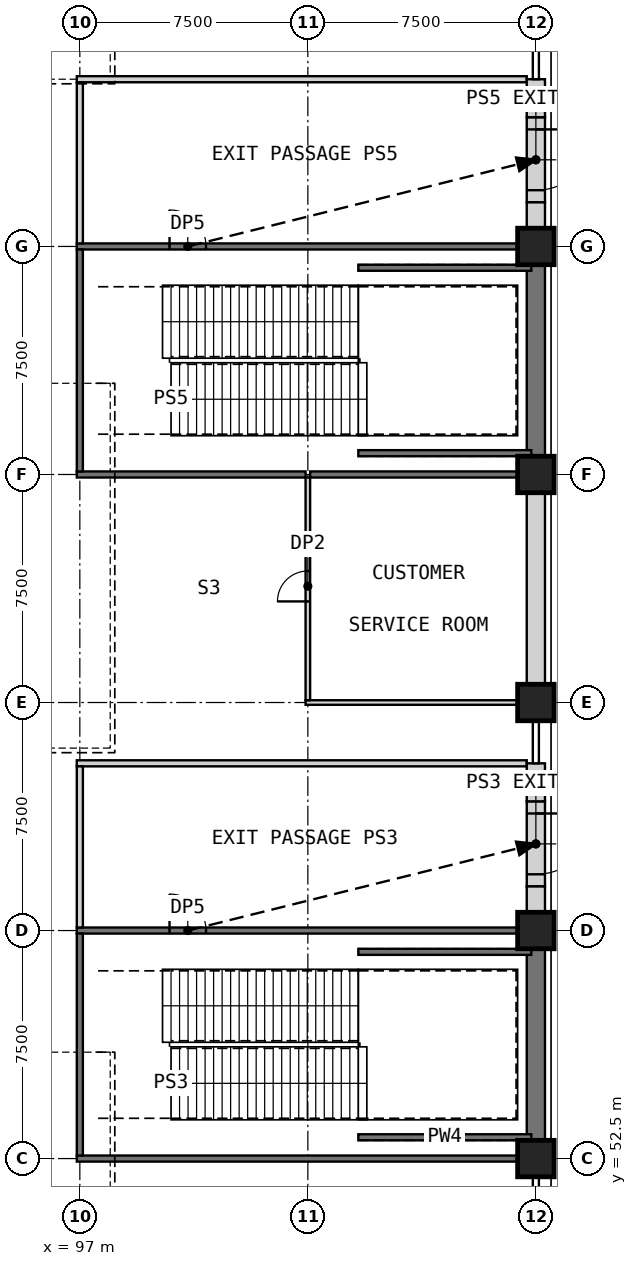
"""IFC4 building model, lengths in metres.
Left out: names, types, materials, properties, quantities, classifications, styles, units other than length and angle.
Written with IfcOpenShell. Run it as: python <this file> out.ifc"""

import sys

from ifc_helpers import new_model, si_unit, direction, frame, frame_2d, origin, origin_2d, place, context, subcontext, project, spatial, rectangle, extrude, element, fill, save


model = new_model("IFC4")
c1 = context("Model", 3, precision=1e-05, world=origin(), true_north=direction((0.0, 1.0)))
c2 = subcontext(c1, "Body", "Model", "MODEL_VIEW")
j1 = project(units=[si_unit("LENGTHUNIT", "METRE"), si_unit("PLANEANGLEUNIT", "RADIAN")], contexts=[c1])
p1 = place(None, origin())
s1 = spatial("IfcSite", under=j1, at=p1, CompositionType="ELEMENT")
p2 = place(p1, origin())
s2 = spatial("IfcBuilding", under=s1, at=p2, CompositionType="ELEMENT")
p3 = place(p2, origin())
s3 = spatial("IfcBuildingStorey", under=s2, at=p3, CompositionType="ELEMENT", Elevation=0.0)
for number, where, z_axis, x_axis in (
    (1, (112.0, 52.5, 0.0), (0.0, 0.0, 1.0), (1.0, 0.0, 0.0)),
    (2, (112.0, 60.0, 0.0), (0.0, 0.0, 1.0), (1.0, 0.0, 0.0)),
    (3, (112.0, 67.5, 0.0), (0.0, 0.0, 1.0), (1.0, 0.0, 0.0)),
    (4, (112.0, 75.0, 0.0), (0.0, 0.0, 1.0), (1.0, 0.0, 0.0)),
    (5, (112.0, 82.5, 0.0), (0.0, 0.0, 1.0), (1.0, 0.0, 0.0)),
):
    element("IfcColumn", number, at=place(p3, frame(where, z_axis=z_axis, x_axis=x_axis)), inside=s3, PredefinedType="COLUMN", context=c2, shape_type="SweptSolid", body=[
        extrude(rectangle(XDim=1.2, YDim=1.2, at=origin_2d()), origin(), (0.0, 0.0, 1.0), 8.0),
    ])
p4 = place(p3, frame((96.9, 52.5, 0.0), z_axis=(0.0, 0.0, 1.0), x_axis=(1.0, 0.0, 0.0)))
e6 = element("IfcWall", 6, at=p4, inside=s3, PredefinedType="SHEAR", context=c2, shape_type="SweptSolid", body=[
    extrude(rectangle(XDim=14.5, YDim=0.2, at=frame_2d((7.25, 0.0))), origin(), (0.0, 0.0, 1.0), 5.5),
])
p5 = place(p3, frame((96.9, 60.0, 0.0), z_axis=(0.0, 0.0, 1.0), x_axis=(1.0, 0.0, 0.0)))
e7 = element("IfcWall", 7, at=p5, inside=s3, PredefinedType="SHEAR", context=c2, shape_type="SweptSolid", body=[
    extrude(rectangle(XDim=14.5, YDim=0.2, at=frame_2d((7.25, 0.0))), origin(), (0.0, 0.0, 1.0), 5.5),
])
p6 = place(p5, frame((3.05, 0.0, 0.0)))
e8 = element("IfcOpeningElement", 8, at=p6, cuts=e7, PredefinedType="OPENING", context=c2, shape_type="SweptSolid", body=[
    extrude(rectangle(XDim=1.2, YDim=2.1, at=frame_2d((0.6, 1.05))), frame((0.0, 0.11, 0.0), z_axis=(0.0, -1.0, 0.0), x_axis=(1.0, 0.0, 0.0)), (0.0, 0.0, 1.0), 0.22),
])
p7 = place(p3, frame((96.9, 82.5, 0.0), z_axis=(0.0, 0.0, 1.0), x_axis=(1.0, 0.0, 0.0)))
e9 = element("IfcWall", 9, at=p7, inside=s3, PredefinedType="SHEAR", context=c2, shape_type="SweptSolid", body=[
    extrude(rectangle(XDim=14.5, YDim=0.2, at=frame_2d((7.25, 0.0))), origin(), (0.0, 0.0, 1.0), 5.5),
])
p8 = place(p7, frame((3.05, 0.0, 0.0)))
e10 = element("IfcOpeningElement", 10, at=p8, cuts=e9, PredefinedType="OPENING", context=c2, shape_type="SweptSolid", body=[
    extrude(rectangle(XDim=1.2, YDim=2.1, at=frame_2d((0.6, 1.05))), frame((0.0, 0.11, 0.0), z_axis=(0.0, -1.0, 0.0), x_axis=(1.0, 0.0, 0.0)), (0.0, 0.0, 1.0), 0.22),
])
p9 = place(p3, frame((96.9, 75.0, 0.0), z_axis=(0.0, 0.0, 1.0), x_axis=(1.0, 0.0, 0.0)))
e11 = element("IfcWall", 11, at=p9, inside=s3, PredefinedType="SHEAR", context=c2, shape_type="SweptSolid", body=[
    extrude(rectangle(XDim=7.525, YDim=0.2, at=frame_2d((3.763, 0.0))), origin(), (0.0, 0.0, 1.0), 5.5),
])
p10 = place(p3, frame((104.575, 75.0, 0.0), z_axis=(0.0, 0.0, 1.0), x_axis=(1.0, 0.0, 0.0)))
e12 = element("IfcWall", 12, at=p10, inside=s3, PredefinedType="SHEAR", context=c2, shape_type="SweptSolid", body=[
    extrude(rectangle(XDim=6.825, YDim=0.2, at=frame_2d((3.413, 0.0))), origin(), (0.0, 0.0, 1.0), 5.5),
])
p11 = place(p3, frame((96.9, 65.5, 0.0), z_axis=(0.0, 0.0, 1.0), x_axis=(1.0, 0.0, 0.0)))
e13 = element("IfcWall", 13, at=p11, inside=s3, PredefinedType="PARTITIONING", context=c2, shape_type="SweptSolid", body=[
    extrude(rectangle(XDim=14.8, YDim=0.2, at=frame_2d((7.4, 0.0))), origin(), (0.0, 0.0, 1.0), 7.7),
])
p12 = place(p3, frame((104.425, 67.5, 0.0), z_axis=(0.0, 0.0, 1.0), x_axis=(1.0, 0.0, 0.0)))
e14 = element("IfcWall", 14, at=p12, inside=s3, PredefinedType="PARTITIONING", context=c2, shape_type="SweptSolid", body=[
    extrude(rectangle(XDim=6.975, YDim=0.15, at=frame_2d((3.487, 0.0))), origin(), (0.0, 0.0, 1.0), 5.5),
])
p13 = place(p3, frame((96.9, 88.0, 0.0), z_axis=(0.0, 0.0, 1.0), x_axis=(1.0, 0.0, 0.0)))
e15 = element("IfcWall", 15, at=p13, inside=s3, PredefinedType="PARTITIONING", context=c2, shape_type="SweptSolid", body=[
    extrude(rectangle(XDim=14.8, YDim=0.2, at=frame_2d((7.4, 0.0))), origin(), (0.0, 0.0, 1.0), 7.7),
])
p14 = place(p3, frame((112.0, 53.1, 0.0), z_axis=(0.0, 0.0, 1.0), x_axis=(0.0, 1.0, 0.0)))
e16 = element("IfcWall", 16, at=p14, inside=s3, PredefinedType="PARTITIONING", context=c2, shape_type="SweptSolid", body=[
    extrude(rectangle(XDim=6.3, YDim=0.6, at=frame_2d((3.15, 0.0))), origin(), (0.0, 0.0, 1.0), 7.1),
])
p15 = place(p3, frame((112.0, 64.25, 0.0), z_axis=(0.0, 0.0, 1.0), x_axis=(0.0, -1.0, 0.0)))
e17 = element("IfcWall", 17, at=p15, inside=s3, PredefinedType="PARTITIONING", context=c2, shape_type="SweptSolid", body=[
    extrude(rectangle(XDim=2.8, YDim=0.6, at=frame_2d((1.4, 0.0))), origin(), (0.0, 0.0, 1.0), 7.1),
])
p16 = place(p15, frame((0.4, 0.0, 0.0)))
e18 = element("IfcOpeningElement", 18, at=p16, cuts=e17, PredefinedType="OPENING", context=c2, shape_type="SweptSolid", body=[
    extrude(rectangle(XDim=2.0, YDim=2.4, at=frame_2d((1.0, 1.2))), frame((0.0, 0.31, 0.0), z_axis=(0.0, -1.0, 0.0), x_axis=(1.0, 0.0, 0.0)), (0.0, 0.0, 1.0), 0.62),
])
p17 = place(p3, frame((112.0, 60.6, 0.0), z_axis=(0.0, 0.0, 1.0), x_axis=(0.0, 1.0, 0.0)))
e19 = element("IfcWall", 19, at=p17, inside=s3, PredefinedType="PARTITIONING", context=c2, shape_type="SweptSolid", body=[
    extrude(rectangle(XDim=0.85, YDim=0.6, at=frame_2d((0.425, 0.0))), origin(), (0.0, 0.0, 1.0), 7.1),
])
p18 = place(p3, frame((112.0, 64.25, 0.0), z_axis=(0.0, 0.0, 1.0), x_axis=(0.0, 1.0, 0.0)))
e20 = element("IfcWall", 20, at=p18, inside=s3, PredefinedType="PARTITIONING", context=c2, shape_type="SweptSolid", body=[
    extrude(rectangle(XDim=1.25, YDim=0.6, at=frame_2d((0.625, 0.0))), origin(), (0.0, 0.0, 1.0), 7.1),
])
for number, where, z_axis, x_axis in (
    (21, (112.0, 68.1, 0.0), (0.0, 0.0, 1.0), (0.0, 1.0, 0.0)),
    (22, (112.0, 75.6, 0.0), (0.0, 0.0, 1.0), (0.0, 1.0, 0.0)),
):
    element("IfcWall", number, at=place(p3, frame(where, z_axis=z_axis, x_axis=x_axis)), inside=s3, PredefinedType="PARTITIONING", context=c2, shape_type="SweptSolid", body=[
        extrude(rectangle(XDim=6.3, YDim=0.6, at=frame_2d((3.15, 0.0))), origin(), (0.0, 0.0, 1.0), 7.1),
    ])
p19 = place(p3, frame((112.0, 86.75, 0.0), z_axis=(0.0, 0.0, 1.0), x_axis=(0.0, -1.0, 0.0)))
e23 = element("IfcWall", 23, at=p19, inside=s3, PredefinedType="PARTITIONING", context=c2, shape_type="SweptSolid", body=[
    extrude(rectangle(XDim=2.8, YDim=0.6, at=frame_2d((1.4, 0.0))), origin(), (0.0, 0.0, 1.0), 7.1),
])
p20 = place(p19, frame((0.4, 0.0, 0.0)))
e24 = element("IfcOpeningElement", 24, at=p20, cuts=e23, PredefinedType="OPENING", context=c2, shape_type="SweptSolid", body=[
    extrude(rectangle(XDim=2.0, YDim=2.4, at=frame_2d((1.0, 1.2))), frame((0.0, 0.31, 0.0), z_axis=(0.0, -1.0, 0.0), x_axis=(1.0, 0.0, 0.0)), (0.0, 0.0, 1.0), 0.62),
])
p21 = place(p3, frame((112.0, 83.1, 0.0), z_axis=(0.0, 0.0, 1.0), x_axis=(0.0, 1.0, 0.0)))
e25 = element("IfcWall", 25, at=p21, inside=s3, PredefinedType="PARTITIONING", context=c2, shape_type="SweptSolid", body=[
    extrude(rectangle(XDim=0.85, YDim=0.6, at=frame_2d((0.425, 0.0))), origin(), (0.0, 0.0, 1.0), 7.1),
])
p22 = place(p3, frame((112.0, 86.75, 0.0), z_axis=(0.0, 0.0, 1.0), x_axis=(0.0, 1.0, 0.0)))
e26 = element("IfcWall", 26, at=p22, inside=s3, PredefinedType="PARTITIONING", context=c2, shape_type="SweptSolid", body=[
    extrude(rectangle(XDim=1.25, YDim=0.6, at=frame_2d((0.625, 0.0))), origin(), (0.0, 0.0, 1.0), 7.1),
])
p23 = place(p3, frame((97.0, 52.6, 0.0), z_axis=(0.0, 0.0, 1.0), x_axis=(0.0, 1.0, 0.0)))
e27 = element("IfcWall", 27, at=p23, inside=s3, PredefinedType="SHEAR", context=c2, shape_type="SweptSolid", body=[
    extrude(rectangle(XDim=7.3, YDim=0.2, at=frame_2d((3.65, 0.0))), origin(), (0.0, 0.0, 1.0), 5.5),
])
p24 = place(p3, frame((97.0, 60.1, 0.0), z_axis=(0.0, 0.0, 1.0), x_axis=(0.0, 1.0, 0.0)))
e28 = element("IfcWall", 28, at=p24, inside=s3, PredefinedType="PARTITIONING", context=c2, shape_type="SweptSolid", body=[
    extrude(rectangle(XDim=5.3, YDim=0.2, at=frame_2d((2.65, 0.0))), origin(), (0.0, 0.0, 1.0), 5.5),
])
p25 = place(p3, frame((97.0, 75.1, 0.0), z_axis=(0.0, 0.0, 1.0), x_axis=(0.0, 1.0, 0.0)))
e29 = element("IfcWall", 29, at=p25, inside=s3, PredefinedType="SHEAR", context=c2, shape_type="SweptSolid", body=[
    extrude(rectangle(XDim=7.3, YDim=0.2, at=frame_2d((3.65, 0.0))), origin(), (0.0, 0.0, 1.0), 5.5),
])
p26 = place(p3, frame((97.0, 82.6, 0.0), z_axis=(0.0, 0.0, 1.0), x_axis=(0.0, 1.0, 0.0)))
e30 = element("IfcWall", 30, at=p26, inside=s3, PredefinedType="PARTITIONING", context=c2, shape_type="SweptSolid", body=[
    extrude(rectangle(XDim=5.3, YDim=0.2, at=frame_2d((2.65, 0.0))), origin(), (0.0, 0.0, 1.0), 5.5),
])
p27 = place(p3, frame((104.5, 67.575, 0.0), z_axis=(0.0, 0.0, 1.0), x_axis=(0.0, 1.0, 0.0)))
e31 = element("IfcWall", 31, at=p27, inside=s3, PredefinedType="PARTITIONING", context=c2, shape_type="SweptSolid", body=[
    extrude(rectangle(XDim=7.325, YDim=0.15, at=frame_2d((3.663, 0.0))), origin(), (0.0, 0.0, 1.0), 5.5),
])
p28 = place(p27, frame((3.25, 0.0, 0.0)))
e32 = element("IfcOpeningElement", 32, at=p28, cuts=e31, PredefinedType="OPENING", context=c2, shape_type="SweptSolid", body=[
    extrude(rectangle(XDim=1.0, YDim=2.1, at=frame_2d((0.5, 1.05))), frame((0.0, 0.085, 0.0), z_axis=(0.0, -1.0, 0.0), x_axis=(1.0, 0.0, 0.0)), (0.0, 0.0, 1.0), 0.17),
])
for number, where, z_axis, x_axis in (
    (33, (106.16, 53.2, 0.0), (0.0, 0.0, 1.0), (1.0, 0.0, 0.0)),
    (34, (106.16, 59.3, 0.0), (0.0, 0.0, 1.0), (1.0, 0.0, 0.0)),
    (35, (106.16, 75.7, 0.0), (0.0, 0.0, 1.0), (1.0, 0.0, 0.0)),
    (36, (106.16, 81.8, 0.0), (0.0, 0.0, 1.0), (1.0, 0.0, 0.0)),
):
    element("IfcWall", number, at=place(p3, frame(where, z_axis=z_axis, x_axis=x_axis)), inside=s3, PredefinedType="SHEAR", context=c2, shape_type="SweptSolid", body=[
        extrude(rectangle(XDim=5.69, YDim=0.2, at=frame_2d((2.845, 0.0))), origin(), (0.0, 0.0, 1.0), 3.8),
    ])
p29 = place(p6, origin())
e37 = element("IfcDoor", 37, at=p29, inside=s3, OperationType="SINGLE_SWING_LEFT", PredefinedType="DOOR", context=c2, shape_type="SweptSolid", body=[
    extrude(rectangle(XDim=1.2, YDim=2.1, at=frame_2d((0.6, 1.05))), frame((0.0, 0.025, 0.0), z_axis=(0.0, -1.0, 0.0), x_axis=(1.0, 0.0, 0.0)), (0.0, 0.0, 1.0), 0.05),
])
fill(e8, e37)
p30 = place(p8, origin())
e38 = element("IfcDoor", 38, at=p30, inside=s3, OperationType="SINGLE_SWING_LEFT", PredefinedType="DOOR", context=c2, shape_type="SweptSolid", body=[
    extrude(rectangle(XDim=1.2, YDim=2.1, at=frame_2d((0.6, 1.05))), frame((0.0, 0.025, 0.0), z_axis=(0.0, -1.0, 0.0), x_axis=(1.0, 0.0, 0.0)), (0.0, 0.0, 1.0), 0.05),
])
fill(e10, e38)
p31 = place(p16, origin())
e39 = element("IfcDoor", 39, at=p31, inside=s3, OperationType="SINGLE_SWING_LEFT", PredefinedType="DOOR", context=c2, shape_type="SweptSolid", body=[
    extrude(rectangle(XDim=2.0, YDim=2.4, at=frame_2d((1.0, 1.2))), frame((0.0, 0.025, 0.0), z_axis=(0.0, -1.0, 0.0), x_axis=(1.0, 0.0, 0.0)), (0.0, 0.0, 1.0), 0.05),
])
fill(e18, e39)
p32 = place(p20, origin())
e40 = element("IfcDoor", 40, at=p32, inside=s3, OperationType="SINGLE_SWING_LEFT", PredefinedType="DOOR", context=c2, shape_type="SweptSolid", body=[
    extrude(rectangle(XDim=2.0, YDim=2.4, at=frame_2d((1.0, 1.2))), frame((0.0, 0.025, 0.0), z_axis=(0.0, -1.0, 0.0), x_axis=(1.0, 0.0, 0.0)), (0.0, 0.0, 1.0), 0.05),
])
fill(e24, e40)
p33 = place(p28, origin())
e41 = element("IfcDoor", 41, at=p33, inside=s3, OperationType="SINGLE_SWING_LEFT", PredefinedType="DOOR", context=c2, shape_type="SweptSolid", body=[
    extrude(rectangle(XDim=1.0, YDim=2.1, at=frame_2d((0.5, 1.05))), frame((0.0, 0.025, 0.0), z_axis=(0.0, -1.0, 0.0), x_axis=(1.0, 0.0, 0.0)), (0.0, 0.0, 1.0), 0.05),
])
fill(e32, e41)
save(model, sys.argv[1])
